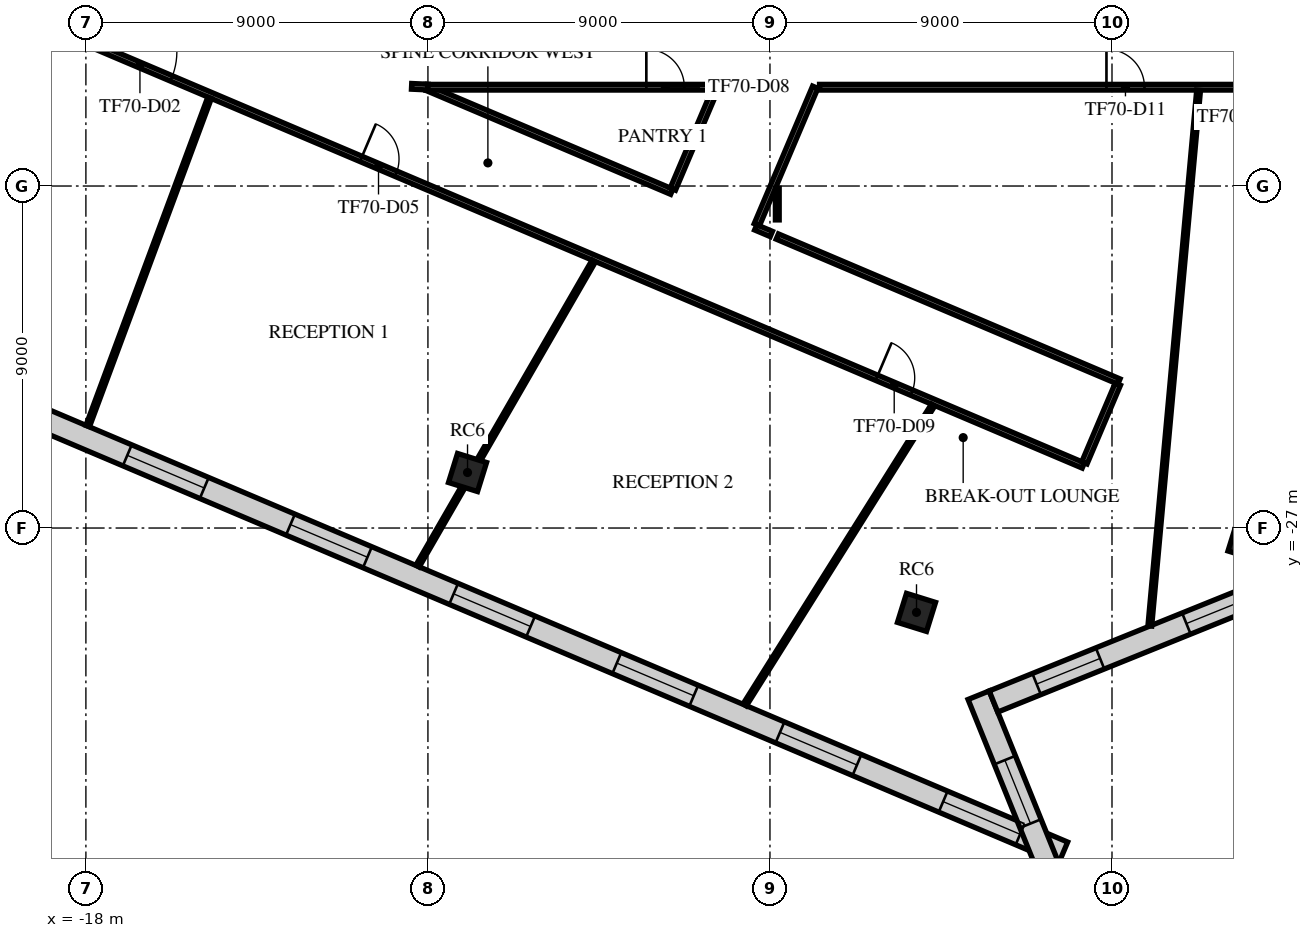
"""IFC4 building model, lengths in metres.
Left out: names, types, materials, properties, quantities, classifications, styles, units other than length and angle.
Written with IfcOpenShell. Run it as: python <this file> out.ifc"""

import sys

from ifc_helpers import new_model, si_unit, direction, frame, frame_2d, origin, origin_2d, place, context, subcontext, project, spatial, rectangle, extrude, element, fill, save


model = new_model("IFC4")
c1 = context("Model", 3, precision=1e-05, world=origin(), true_north=direction((0.0, 1.0)))
c2 = subcontext(c1, "Body", "Model", "MODEL_VIEW")
j1 = project(units=[si_unit("LENGTHUNIT", "METRE"), si_unit("PLANEANGLEUNIT", "RADIAN")], contexts=[c1])
p1 = place(None, origin())
s1 = spatial("IfcSite", under=j1, at=p1, CompositionType="ELEMENT")
p2 = place(p1, origin())
s2 = spatial("IfcBuilding", under=s1, at=p2, CompositionType="ELEMENT")
p3 = place(p2, frame((0.0, 0.0, 296.5)))
s3 = spatial("IfcBuildingStorey", under=s2, at=p3, CompositionType="ELEMENT", Elevation=296.5)
for number, where, z_axis, x_axis in (
    (1, (-7.958, -25.539, -0.35), (0.0, 0.0, 1.0), (0.298, 0.955, 0.0)),
    (2, (3.856, -29.22, -0.35), (0.0, 0.0, 1.0), (0.298, 0.955, 0.0)),
):
    element("IfcColumn", number, at=place(p3, frame(where, z_axis=z_axis, x_axis=x_axis)), inside=s3, PredefinedType="COLUMN", context=c2, shape_type="SweptSolid", body=[
        extrude(rectangle(XDim=0.8, YDim=0.8, at=origin_2d()), origin(), (0.0, 0.0, 1.0), 4.35),
    ])
p4 = place(p3, frame((12.929, -27.144, -0.35), z_axis=(0.0, 0.0, 1.0), x_axis=(0.297503182032, 0.954720826567, 0.0)))
e3 = element("IfcColumn", 3, at=p4, inside=s3, PredefinedType="COLUMN", context=c2, shape_type="SweptSolid", body=[
    extrude(rectangle(XDim=1.4, YDim=1.4, at=origin_2d()), origin(), (0.0, 0.0, 1.0), 4.35),
])
p5 = place(p3, frame((-30.926, -19.138, 0.0), z_axis=(0.0, 0.0, 1.0), x_axis=(0.920504905663, -0.39073100549, 0.0)))
e4 = element("IfcWall", 4, at=p5, inside=s3, PredefinedType="STANDARD", context=c2, shape_type="SweptSolid", body=[
    extrude(rectangle(XDim=41.979, YDim=0.6, at=frame_2d((20.99, 0.0))), origin(), (0.0, 0.0, 1.0), 3.65),
])
p6 = place(p5, frame((1.232, 0.0, 0.9)))
e5 = element("IfcOpeningElement", 5, at=p6, cuts=e4, PredefinedType="OPENING", context=c2, shape_type="SweptSolid", body=[
    extrude(rectangle(XDim=2.2, YDim=2.1, at=frame_2d((1.1, 1.05))), frame((0.0, 0.31, 0.0), z_axis=(0.0, -1.0, 0.0), x_axis=(1.0, 0.0, 0.0)), (0.0, 0.0, 1.0), 0.62),
])
p7 = place(p5, frame((5.896, 0.0, 0.9)))
e6 = element("IfcOpeningElement", 6, at=p7, cuts=e4, PredefinedType="OPENING", context=c2, shape_type="SweptSolid", body=[
    extrude(rectangle(XDim=2.2, YDim=2.1, at=frame_2d((1.1, 1.05))), frame((0.0, 0.31, 0.0), z_axis=(0.0, -1.0, 0.0), x_axis=(1.0, 0.0, 0.0)), (0.0, 0.0, 1.0), 0.62),
])
p8 = place(p5, frame((10.561, 0.0, 0.9)))
e7 = element("IfcOpeningElement", 7, at=p8, cuts=e4, PredefinedType="OPENING", context=c2, shape_type="SweptSolid", body=[
    extrude(rectangle(XDim=2.2, YDim=2.1, at=frame_2d((1.1, 1.05))), frame((0.0, 0.31, 0.0), z_axis=(0.0, -1.0, 0.0), x_axis=(1.0, 0.0, 0.0)), (0.0, 0.0, 1.0), 0.62),
])
p9 = place(p5, frame((15.225, 0.0, 0.9)))
e8 = element("IfcOpeningElement", 8, at=p9, cuts=e4, PredefinedType="OPENING", context=c2, shape_type="SweptSolid", body=[
    extrude(rectangle(XDim=2.2, YDim=2.1, at=frame_2d((1.1, 1.05))), frame((0.0, 0.31, 0.0), z_axis=(0.0, -1.0, 0.0), x_axis=(1.0, 0.0, 0.0)), (0.0, 0.0, 1.0), 0.62),
])
p10 = place(p5, frame((19.89, 0.0, 0.9)))
e9 = element("IfcOpeningElement", 9, at=p10, cuts=e4, PredefinedType="OPENING", context=c2, shape_type="SweptSolid", body=[
    extrude(rectangle(XDim=2.2, YDim=2.1, at=frame_2d((1.1, 1.05))), frame((0.0, 0.31, 0.0), z_axis=(0.0, -1.0, 0.0), x_axis=(1.0, 0.0, 0.0)), (0.0, 0.0, 1.0), 0.62),
])
p11 = place(p5, frame((24.554, 0.0, 0.9)))
e10 = element("IfcOpeningElement", 10, at=p11, cuts=e4, PredefinedType="OPENING", context=c2, shape_type="SweptSolid", body=[
    extrude(rectangle(XDim=2.2, YDim=2.1, at=frame_2d((1.1, 1.05))), frame((0.0, 0.31, 0.0), z_axis=(0.0, -1.0, 0.0), x_axis=(1.0, 0.0, 0.0)), (0.0, 0.0, 1.0), 0.62),
])
p12 = place(p5, frame((29.218, 0.0, 0.9)))
e11 = element("IfcOpeningElement", 11, at=p12, cuts=e4, PredefinedType="OPENING", context=c2, shape_type="SweptSolid", body=[
    extrude(rectangle(XDim=2.2, YDim=2.1, at=frame_2d((1.1, 1.05))), frame((0.0, 0.31, 0.0), z_axis=(0.0, -1.0, 0.0), x_axis=(1.0, 0.0, 0.0)), (0.0, 0.0, 1.0), 0.62),
])
p13 = place(p5, frame((33.883, 0.0, 0.9)))
e12 = element("IfcOpeningElement", 12, at=p13, cuts=e4, PredefinedType="OPENING", context=c2, shape_type="SweptSolid", body=[
    extrude(rectangle(XDim=2.2, YDim=2.1, at=frame_2d((1.1, 1.05))), frame((0.0, 0.31, 0.0), z_axis=(0.0, -1.0, 0.0), x_axis=(1.0, 0.0, 0.0)), (0.0, 0.0, 1.0), 0.62),
])
p14 = place(p5, frame((38.547, 0.0, 0.9)))
e13 = element("IfcOpeningElement", 13, at=p14, cuts=e4, PredefinedType="OPENING", context=c2, shape_type="SweptSolid", body=[
    extrude(rectangle(XDim=2.2, YDim=2.1, at=frame_2d((1.1, 1.05))), frame((0.0, 0.31, 0.0), z_axis=(0.0, -1.0, 0.0), x_axis=(1.0, 0.0, 0.0)), (0.0, 0.0, 1.0), 0.62),
])
p15 = place(p3, frame((7.321, -35.929, 0.0), z_axis=(0.0, 0.0, 1.0), x_axis=(-0.374593593988, 0.927189106571, 0.0)))
e14 = element("IfcWall", 14, at=p15, inside=s3, PredefinedType="STANDARD", context=c2, shape_type="SweptSolid", body=[
    extrude(rectangle(XDim=4.885, YDim=0.6, at=frame_2d((2.443, 0.0))), origin(), (0.0, 0.0, 1.0), 3.65),
])
p16 = place(p15, frame((1.243, 0.0, 0.9)))
e15 = element("IfcOpeningElement", 15, at=p16, cuts=e14, PredefinedType="OPENING", context=c2, shape_type="SweptSolid", body=[
    extrude(rectangle(XDim=1.8, YDim=2.1, at=frame_2d((0.9, 1.05))), frame((0.0, 0.31, 0.0), z_axis=(0.0, -1.0, 0.0), x_axis=(1.0, 0.0, 0.0)), (0.0, 0.0, 1.0), 0.62),
])
p17 = place(p3, frame((5.881, -31.565, 0.0), z_axis=(0.0, 0.0, 1.0), x_axis=(0.927187551636, 0.37459744272, 0.0)))
e16 = element("IfcWall", 16, at=p17, inside=s3, PredefinedType="STANDARD", context=c2, shape_type="SweptSolid", body=[
    extrude(rectangle(XDim=8.5, YDim=0.6, at=frame_2d((4.25, 0.0))), origin(), (0.0, 0.0, 1.0), 3.65),
])
p18 = place(p17, frame((1.225, 0.0, 0.9)))
e17 = element("IfcOpeningElement", 17, at=p18, cuts=e16, PredefinedType="OPENING", context=c2, shape_type="SweptSolid", body=[
    extrude(rectangle(XDim=1.8, YDim=2.1, at=frame_2d((0.9, 1.05))), frame((0.0, 0.31, 0.0), z_axis=(0.0, -1.0, 0.0), x_axis=(1.0, 0.0, 0.0)), (0.0, 0.0, 1.0), 0.62),
])
p19 = place(p17, frame((5.475, 0.0, 0.9)))
e18 = element("IfcOpeningElement", 18, at=p19, cuts=e16, PredefinedType="OPENING", context=c2, shape_type="SweptSolid", body=[
    extrude(rectangle(XDim=1.8, YDim=2.1, at=frame_2d((0.9, 1.05))), frame((0.0, 0.31, 0.0), z_axis=(0.0, -1.0, 0.0), x_axis=(1.0, 0.0, 0.0)), (0.0, 0.0, 1.0), 0.62),
])
p20 = place(p3, frame((-23.896, -11.711, 0.0), z_axis=(0.0, 0.0, 1.0), x_axis=(0.920507643781, -0.390724554821, 0.0)))
e19 = element("IfcWall", 19, at=p20, inside=s3, PredefinedType="PARTITIONING", context=c2, shape_type="SweptSolid", body=[
    extrude(rectangle(XDim=34.917, YDim=0.15, at=frame_2d((17.458, 0.0))), origin(), (0.0, 0.0, 1.0), 3.25),
])
p21 = place(p20, frame((7.05, 0.0, 0.0)))
e20 = element("IfcOpeningElement", 20, at=p21, cuts=e19, PredefinedType="OPENING", context=c2, shape_type="SweptSolid", body=[
    extrude(rectangle(XDim=1.8, YDim=2.1, at=frame_2d((0.9, 1.05))), frame((0.0, 0.085, 0.0), z_axis=(0.0, -1.0, 0.0), x_axis=(1.0, 0.0, 0.0)), (0.0, 0.0, 1.0), 0.17),
])
p22 = place(p20, frame((14.27, 0.0, 0.0)))
e21 = element("IfcOpeningElement", 21, at=p22, cuts=e19, PredefinedType="OPENING", context=c2, shape_type="SweptSolid", body=[
    extrude(rectangle(XDim=1.0, YDim=2.1, at=frame_2d((0.5, 1.05))), frame((0.0, 0.085, 0.0), z_axis=(0.0, -1.0, 0.0), x_axis=(1.0, 0.0, 0.0)), (0.0, 0.0, 1.0), 0.17),
])
p23 = place(p20, frame((29.011, 0.0, 0.0)))
e22 = element("IfcOpeningElement", 22, at=p23, cuts=e19, PredefinedType="OPENING", context=c2, shape_type="SweptSolid", body=[
    extrude(rectangle(XDim=1.0, YDim=2.1, at=frame_2d((0.5, 1.05))), frame((0.0, 0.085, 0.0), z_axis=(0.0, -1.0, 0.0), x_axis=(1.0, 0.0, 0.0)), (0.0, 0.0, 1.0), 0.17),
])
p24 = place(p3, frame((-9.054, -15.404, 0.0), z_axis=(0.0, 0.0, 1.0), x_axis=(0.920529927063, -0.390672053495, 0.0)))
e23 = element("IfcWall", 23, at=p24, inside=s3, PredefinedType="PARTITIONING", context=c2, shape_type="SweptSolid", body=[
    extrude(rectangle(XDim=7.029, YDim=0.15, at=frame_2d((3.514, 0.0))), origin(), (0.0, 0.0, 1.0), 3.25),
])
p25 = place(p3, frame((-9.053, -15.4, 0.0), z_axis=(0.0, 0.0, 1.0), x_axis=(1.0, 0.0, 0.0)))
e24 = element("IfcWall", 24, at=p25, inside=s3, PredefinedType="PARTITIONING", context=c2, shape_type="SweptSolid", body=[
    extrude(rectangle(XDim=7.636, YDim=0.15, at=frame_2d((3.818, 0.0))), origin(), (0.0, 0.0, 1.0), 3.25),
])
p26 = place(p25, frame((5.8, 0.0, 0.0)))
e25 = element("IfcOpeningElement", 25, at=p26, cuts=e24, PredefinedType="OPENING", context=c2, shape_type="SweptSolid", body=[
    extrude(rectangle(XDim=1.0, YDim=2.1, at=frame_2d((0.5, 1.05))), frame((0.0, 0.085, 0.0), z_axis=(0.0, -1.0, 0.0), x_axis=(1.0, 0.0, 0.0)), (0.0, 0.0, 1.0), 0.17),
])
p27 = place(p3, frame((-8.996, -15.397, 0.0), z_axis=(0.0, 0.0, 1.0), x_axis=(-0.998938201598, 0.046070265765, 0.0)))
e26 = element("IfcWall", 26, at=p27, inside=s3, PredefinedType="PARTITIONING", context=c2, shape_type="SweptSolid", body=[
    extrude(rectangle(XDim=0.435, YDim=0.15, at=frame_2d((0.217, 0.0))), origin(), (0.0, 0.0, 1.0), 3.65),
])
p28 = place(p3, frame((-2.555, -18.081, 0.0), z_axis=(0.0, 0.0, 1.0), x_axis=(0.39066407996, 0.920533310983, 0.0)))
e27 = element("IfcWall", 27, at=p28, inside=s3, PredefinedType="PARTITIONING", context=c2, shape_type="SweptSolid", body=[
    extrude(rectangle(XDim=2.799, YDim=0.15, at=frame_2d((1.399, 0.0))), origin(), (0.0, 0.0, 1.0), 3.25),
])
p29 = place(p3, frame((-0.375, -19.088, 0.0), z_axis=(0.0, 0.0, 1.0), x_axis=(0.920778367596, -0.390086141471, 0.0)))
e28 = element("IfcWall", 28, at=p29, inside=s3, PredefinedType="PARTITIONING", context=c2, shape_type="SweptSolid", body=[
    extrude(rectangle(XDim=0.446, YDim=0.15, at=frame_2d((0.223, 0.0))), origin(), (0.0, 0.0, 1.0), 3.65),
])
p30 = place(p3, frame((-0.346, -19.019, 0.0), z_axis=(0.0, 0.0, 1.0), x_axis=(0.390836874274, 0.920459959861, 0.0)))
e29 = element("IfcWall", 29, at=p30, inside=s3, PredefinedType="PARTITIONING", context=c2, shape_type="SweptSolid", body=[
    extrude(rectangle(XDim=3.932, YDim=0.15, at=frame_2d((1.966, 0.0))), origin(), (0.0, 0.0, 1.0), 3.65),
])
p31 = place(p3, frame((0.193, -19.329, 0.0), z_axis=(0.0, 0.0, 1.0), x_axis=(0.92050877494, -0.390721889914, 0.0)))
e30 = element("IfcWall", 30, at=p31, inside=s3, PredefinedType="PARTITIONING", context=c2, shape_type="SweptSolid", body=[
    extrude(rectangle(XDim=9.766, YDim=0.15, at=frame_2d((4.883, 0.0))), origin(), (0.0, 0.0, 1.0), 3.25),
])
p32 = place(p3, frame((1.304, -15.4, 0.0), z_axis=(0.0, 0.0, 1.0), x_axis=(1.0, 0.0, 0.0)))
e31 = element("IfcWall", 31, at=p32, inside=s3, PredefinedType="PARTITIONING", context=c2, shape_type="SweptSolid", body=[
    extrude(rectangle(XDim=13.446, YDim=0.15, at=frame_2d((6.723, 0.0))), origin(), (0.0, 0.0, 1.0), 3.25),
])
p33 = place(p32, frame((7.55, 0.0, 0.0)))
e32 = element("IfcOpeningElement", 32, at=p33, cuts=e31, PredefinedType="OPENING", context=c2, shape_type="SweptSolid", body=[
    extrude(rectangle(XDim=1.0, YDim=2.1, at=frame_2d((0.5, 1.05))), frame((0.0, 0.085, 0.0), z_axis=(0.0, -1.0, 0.0), x_axis=(1.0, 0.0, 0.0)), (0.0, 0.0, 1.0), 0.17),
])
p34 = place(p32, frame((11.278, 0.0, 0.0)))
e33 = element("IfcOpeningElement", 33, at=p34, cuts=e31, PredefinedType="OPENING", context=c2, shape_type="SweptSolid", body=[
    extrude(rectangle(XDim=1.0, YDim=2.1, at=frame_2d((0.5, 1.05))), frame((0.0, 0.085, 0.0), z_axis=(0.0, -1.0, 0.0), x_axis=(1.0, 0.0, 0.0)), (0.0, 0.0, 1.0), 0.17),
])
p35 = place(p3, frame((8.274, -25.285, 0.0), z_axis=(0.0, 0.0, 1.0), x_axis=(0.390878666815, 0.920442213194, 0.0)))
e34 = element("IfcWall", 34, at=p35, inside=s3, PredefinedType="PARTITIONING", context=c2, shape_type="SweptSolid", body=[
    extrude(rectangle(XDim=2.25, YDim=0.15, at=frame_2d((1.125, 0.0))), origin(), (0.0, 0.0, 1.0), 3.25),
])
p36 = place(p3, frame((-17.952, -24.317, 0.0), z_axis=(0.0, 0.0, 1.0), x_axis=(0.348014202779, 0.937489261093, 0.0)))
e35 = element("IfcWall", 35, at=p36, inside=s3, PredefinedType="PARTITIONING", context=c2, shape_type="SweptSolid", body=[
    extrude(rectangle(XDim=9.213, YDim=0.1, at=frame_2d((4.606, 0.0))), origin(), (0.0, 0.0, 1.0), 3.25),
])
p37 = place(p3, frame((-9.273, -28.001, 0.0), z_axis=(0.0, 0.0, 1.0), x_axis=(0.500153880086, 0.865936542845, 0.0)))
e36 = element("IfcWall", 36, at=p37, inside=s3, PredefinedType="PARTITIONING", context=c2, shape_type="SweptSolid", body=[
    extrude(rectangle(XDim=2.4, YDim=0.1, at=frame_2d((1.2, 0.0))), origin(), (0.0, 0.0, 1.0), 3.65),
])
p38 = place(p3, frame((-7.662, -25.212, 0.0), z_axis=(0.0, 0.0, 1.0), x_axis=(0.500102086133, 0.865966456305, 0.0)))
e37 = element("IfcWall", 37, at=p38, inside=s3, PredefinedType="PARTITIONING", context=c2, shape_type="SweptSolid", body=[
    extrude(rectangle(XDim=6.049, YDim=0.1, at=frame_2d((3.024, 0.0))), origin(), (0.0, 0.0, 1.0), 3.25),
])
p39 = place(p3, frame((-0.665, -31.655, 0.0), z_axis=(0.0, 0.0, 1.0), x_axis=(0.531957386579, 0.846771125431, 0.0)))
e38 = element("IfcWall", 38, at=p39, inside=s3, PredefinedType="PARTITIONING", context=c2, shape_type="SweptSolid", body=[
    extrude(rectangle(XDim=9.316, YDim=0.1, at=frame_2d((4.658, 0.0))), origin(), (0.0, 0.0, 1.0), 3.25),
])
p40 = place(p3, frame((0.193, -18.892, 0.0), z_axis=(0.0, 0.0, 1.0), x_axis=(0.0, 1.0, 0.0)))
e39 = element("IfcWall", 39, at=p40, inside=s3, PredefinedType="PARTITIONING", context=c2, shape_type="SweptSolid", body=[
    extrude(rectangle(XDim=0.833, YDim=0.1, at=frame_2d((0.416, 0.0))), origin(), (0.0, 0.0, 1.0), 3.65),
])
p41 = place(p3, frame((9.995, -29.577, 0.0), z_axis=(0.0, 0.0, 1.0), x_axis=(0.090666368484, 0.995881323063, 0.0)))
e40 = element("IfcWall", 40, at=p41, inside=s3, PredefinedType="PARTITIONING", context=c2, shape_type="SweptSolid", body=[
    extrude(rectangle(XDim=14.156, YDim=0.1, at=frame_2d((7.078, 0.0))), origin(), (0.0, 0.0, 1.0), 3.65),
])
p42 = place(p9, origin())
e41 = element("IfcWindow", 41, at=p42, inside=s3, PartitioningType="SINGLE_PANEL", PredefinedType="WINDOW", context=c2, shape_type="SweptSolid", body=[
    extrude(rectangle(XDim=2.2, YDim=2.1, at=frame_2d((1.1, 1.05))), frame((0.0, 0.03, 0.0), z_axis=(0.0, -1.0, 0.0), x_axis=(1.0, 0.0, 0.0)), (0.0, 0.0, 1.0), 0.06),
])
fill(e8, e41)
p43 = place(p10, origin())
e42 = element("IfcWindow", 42, at=p43, inside=s3, PartitioningType="SINGLE_PANEL", PredefinedType="WINDOW", context=c2, shape_type="SweptSolid", body=[
    extrude(rectangle(XDim=2.2, YDim=2.1, at=frame_2d((1.1, 1.05))), frame((0.0, 0.03, 0.0), z_axis=(0.0, -1.0, 0.0), x_axis=(1.0, 0.0, 0.0)), (0.0, 0.0, 1.0), 0.06),
])
fill(e9, e42)
p44 = place(p11, origin())
e43 = element("IfcWindow", 43, at=p44, inside=s3, PartitioningType="SINGLE_PANEL", PredefinedType="WINDOW", context=c2, shape_type="SweptSolid", body=[
    extrude(rectangle(XDim=2.2, YDim=2.1, at=frame_2d((1.1, 1.05))), frame((0.0, 0.03, 0.0), z_axis=(0.0, -1.0, 0.0), x_axis=(1.0, 0.0, 0.0)), (0.0, 0.0, 1.0), 0.06),
])
fill(e10, e43)
p45 = place(p12, origin())
e44 = element("IfcWindow", 44, at=p45, inside=s3, PartitioningType="SINGLE_PANEL", PredefinedType="WINDOW", context=c2, shape_type="SweptSolid", body=[
    extrude(rectangle(XDim=2.2, YDim=2.1, at=frame_2d((1.1, 1.05))), frame((0.0, 0.03, 0.0), z_axis=(0.0, -1.0, 0.0), x_axis=(1.0, 0.0, 0.0)), (0.0, 0.0, 1.0), 0.06),
])
fill(e11, e44)
p46 = place(p13, origin())
e45 = element("IfcWindow", 45, at=p46, inside=s3, PartitioningType="SINGLE_PANEL", PredefinedType="WINDOW", context=c2, shape_type="SweptSolid", body=[
    extrude(rectangle(XDim=2.2, YDim=2.1, at=frame_2d((1.1, 1.05))), frame((0.0, 0.03, 0.0), z_axis=(0.0, -1.0, 0.0), x_axis=(1.0, 0.0, 0.0)), (0.0, 0.0, 1.0), 0.06),
])
fill(e12, e45)
p47 = place(p14, origin())
e46 = element("IfcWindow", 46, at=p47, inside=s3, PartitioningType="SINGLE_PANEL", PredefinedType="WINDOW", context=c2, shape_type="SweptSolid", body=[
    extrude(rectangle(XDim=2.2, YDim=2.1, at=frame_2d((1.1, 1.05))), frame((0.0, 0.03, 0.0), z_axis=(0.0, -1.0, 0.0), x_axis=(1.0, 0.0, 0.0)), (0.0, 0.0, 1.0), 0.06),
])
fill(e13, e46)
p48 = place(p16, origin())
e47 = element("IfcWindow", 47, at=p48, inside=s3, PartitioningType="SINGLE_PANEL", PredefinedType="WINDOW", context=c2, shape_type="SweptSolid", body=[
    extrude(rectangle(XDim=1.8, YDim=2.1, at=frame_2d((0.9, 1.05))), frame((0.0, 0.03, 0.0), z_axis=(0.0, -1.0, 0.0), x_axis=(1.0, 0.0, 0.0)), (0.0, 0.0, 1.0), 0.06),
])
fill(e15, e47)
p49 = place(p18, origin())
e48 = element("IfcWindow", 48, at=p49, inside=s3, PartitioningType="SINGLE_PANEL", PredefinedType="WINDOW", context=c2, shape_type="SweptSolid", body=[
    extrude(rectangle(XDim=1.8, YDim=2.1, at=frame_2d((0.9, 1.05))), frame((0.0, 0.03, 0.0), z_axis=(0.0, -1.0, 0.0), x_axis=(1.0, 0.0, 0.0)), (0.0, 0.0, 1.0), 0.06),
])
fill(e17, e48)
p50 = place(p19, origin())
e49 = element("IfcWindow", 49, at=p50, inside=s3, PartitioningType="SINGLE_PANEL", PredefinedType="WINDOW", context=c2, shape_type="SweptSolid", body=[
    extrude(rectangle(XDim=1.8, YDim=2.1, at=frame_2d((0.9, 1.05))), frame((0.0, 0.03, 0.0), z_axis=(0.0, -1.0, 0.0), x_axis=(1.0, 0.0, 0.0)), (0.0, 0.0, 1.0), 0.06),
])
fill(e18, e49)
p51 = place(p21, frame((1.8, 0.0, 0.0), z_axis=(0.0, 0.0, 1.0), x_axis=(-1.0, 0.0, 0.0)))
e50 = element("IfcDoor", 50, at=p51, inside=s3, OperationType="DOUBLE_DOOR_SINGLE_SWING", PredefinedType="DOOR", context=c2, shape_type="SweptSolid", body=[
    extrude(rectangle(XDim=1.8, YDim=2.1, at=frame_2d((0.9, 1.05))), frame((0.0, 0.025, 0.0), z_axis=(0.0, -1.0, 0.0), x_axis=(1.0, 0.0, 0.0)), (0.0, 0.0, 1.0), 0.05),
])
fill(e20, e50)
p52 = place(p22, frame((1.0, 0.0, 0.0), z_axis=(0.0, 0.0, 1.0), x_axis=(-1.0, 0.0, 0.0)))
e51 = element("IfcDoor", 51, at=p52, inside=s3, OperationType="SINGLE_SWING_RIGHT", PredefinedType="DOOR", context=c2, shape_type="SweptSolid", body=[
    extrude(rectangle(XDim=1.0, YDim=2.1, at=frame_2d((0.5, 1.05))), frame((0.0, 0.025, 0.0), z_axis=(0.0, -1.0, 0.0), x_axis=(1.0, 0.0, 0.0)), (0.0, 0.0, 1.0), 0.05),
])
fill(e21, e51)
p53 = place(p26, frame((1.0, 0.0, 0.0), z_axis=(0.0, 0.0, 1.0), x_axis=(-1.0, 0.0, 0.0)))
e52 = element("IfcDoor", 52, at=p53, inside=s3, OperationType="SINGLE_SWING_RIGHT", PredefinedType="DOOR", context=c2, shape_type="SweptSolid", body=[
    extrude(rectangle(XDim=1.0, YDim=2.1, at=frame_2d((0.5, 1.05))), frame((0.0, 0.025, 0.0), z_axis=(0.0, -1.0, 0.0), x_axis=(1.0, 0.0, 0.0)), (0.0, 0.0, 1.0), 0.05),
])
fill(e25, e52)
p54 = place(p23, frame((1.0, 0.0, 0.0), z_axis=(0.0, 0.0, 1.0), x_axis=(-1.0, 0.0, 0.0)))
e53 = element("IfcDoor", 53, at=p54, inside=s3, OperationType="SINGLE_SWING_LEFT", PredefinedType="DOOR", context=c2, shape_type="SweptSolid", body=[
    extrude(rectangle(XDim=1.0, YDim=2.1, at=frame_2d((0.5, 1.05))), frame((0.0, 0.025, 0.0), z_axis=(0.0, -1.0, 0.0), x_axis=(1.0, 0.0, 0.0)), (0.0, 0.0, 1.0), 0.05),
])
fill(e22, e53)
p55 = place(p33, frame((1.0, 0.0, 0.0), z_axis=(0.0, 0.0, 1.0), x_axis=(-1.0, 0.0, 0.0)))
e54 = element("IfcDoor", 54, at=p55, inside=s3, OperationType="SINGLE_SWING_RIGHT", PredefinedType="DOOR", context=c2, shape_type="SweptSolid", body=[
    extrude(rectangle(XDim=1.0, YDim=2.1, at=frame_2d((0.5, 1.05))), frame((0.0, 0.025, 0.0), z_axis=(0.0, -1.0, 0.0), x_axis=(1.0, 0.0, 0.0)), (0.0, 0.0, 1.0), 0.05),
])
fill(e32, e54)
save(model, sys.argv[1])
